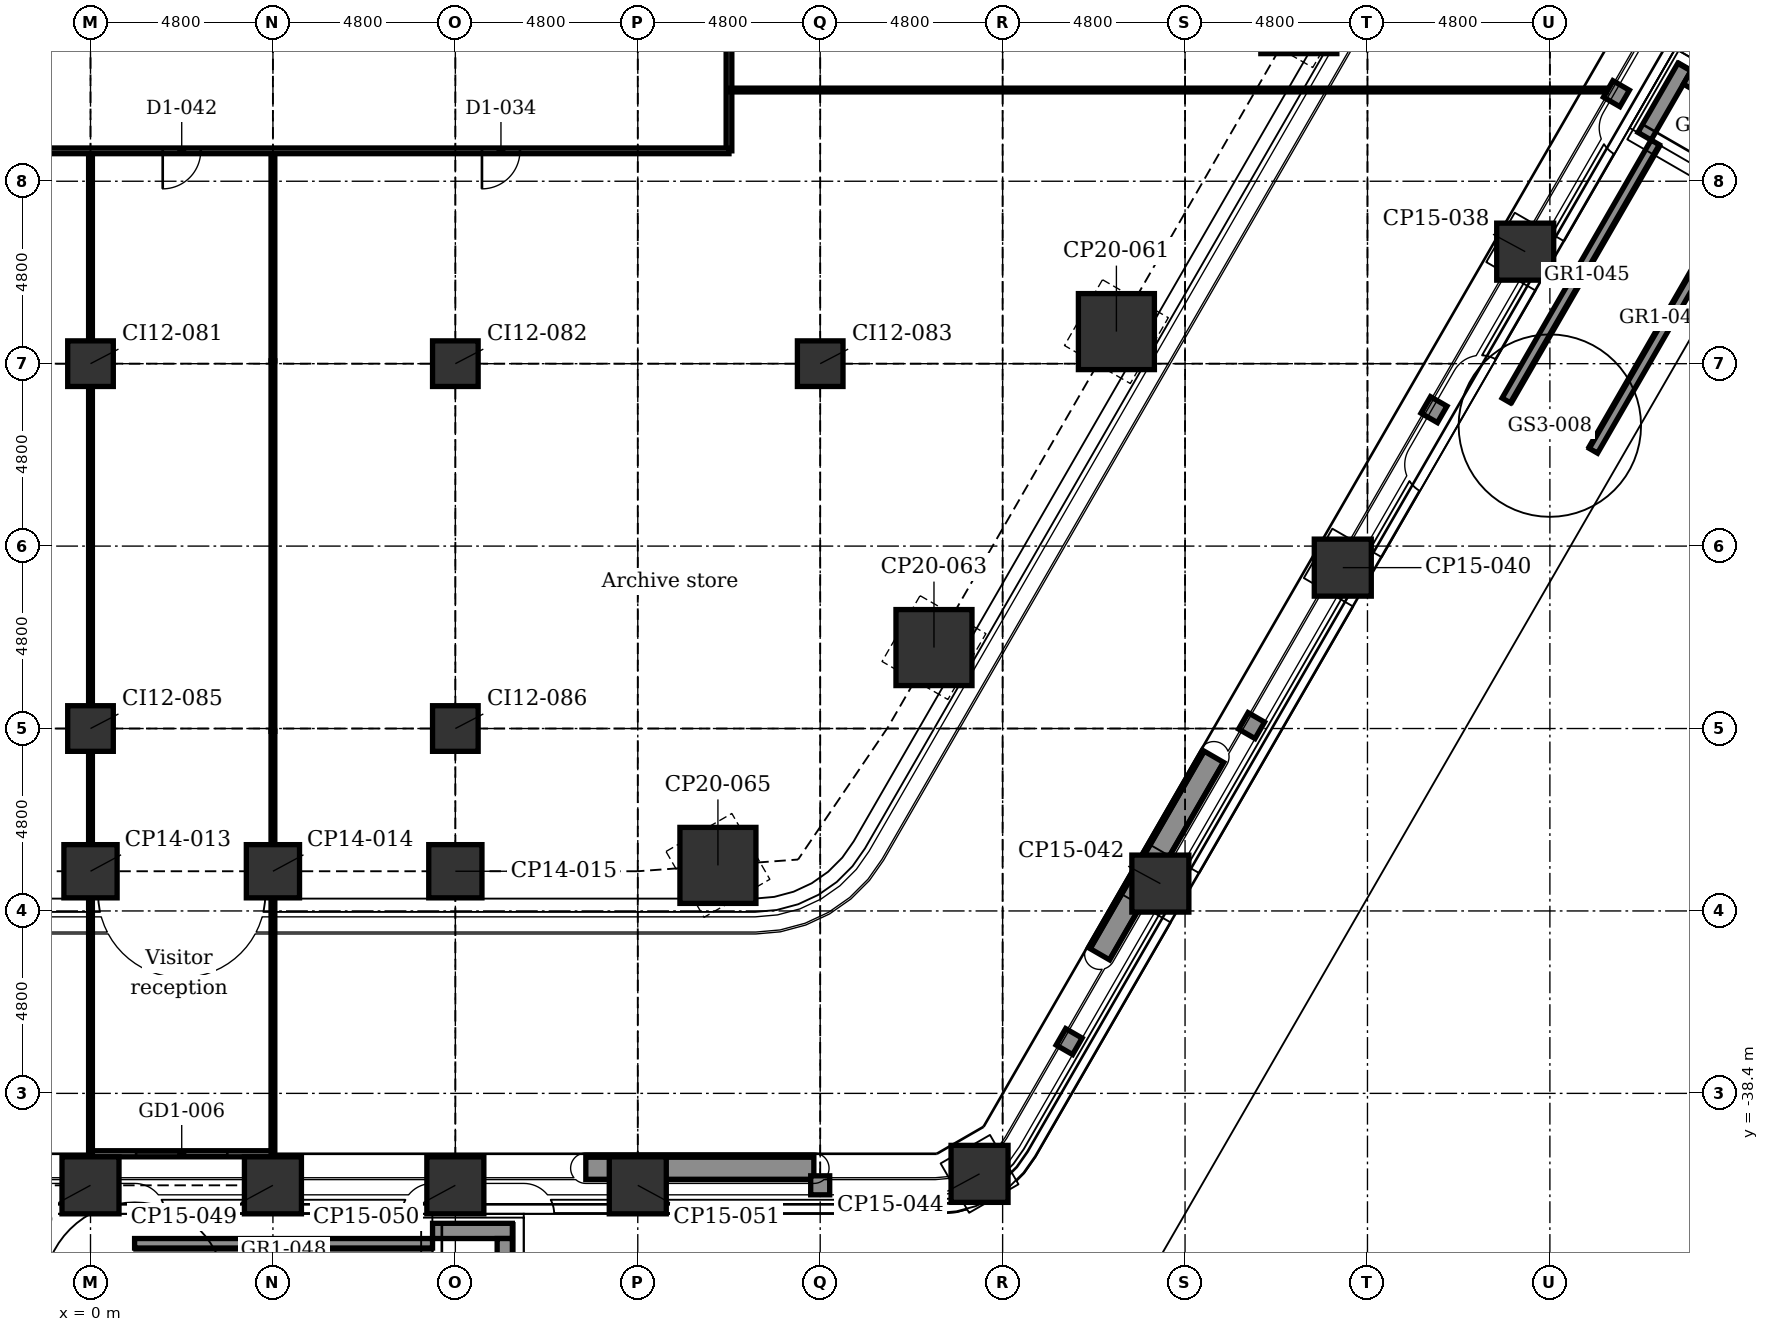
"""IFC4 building model, lengths in metres.
Left out: names, types, materials, properties, quantities, classifications, styles, units other than length and angle.
Written with IfcOpenShell. Run it as: python <this file> out.ifc"""

import sys

from ifc_helpers import new_model, si_unit, direction, frame, frame_2d, origin, origin_2d, place, context, subcontext, project, spatial, polyline, rectangle, outline, extrude, element, fill, save


model = new_model("IFC4")
c1 = context("Model", 3, precision=1e-05, world=origin(), true_north=direction((0.0, 1.0)))
c2 = subcontext(c1, "Body", "Model", "MODEL_VIEW")
j1 = project(units=[si_unit("LENGTHUNIT", "METRE"), si_unit("PLANEANGLEUNIT", "RADIAN")], contexts=[c1])
p1 = place(None, origin())
s1 = spatial("IfcSite", under=j1, at=p1, CompositionType="ELEMENT")
p2 = place(p1, origin())
s2 = spatial("IfcBuilding", under=s1, at=p2, CompositionType="ELEMENT")
p3 = place(p2, frame((0.0, 0.0, 12.4)))
s3 = spatial("IfcBuildingStorey", under=s2, at=p3, CompositionType="ELEMENT", Elevation=12.4)
for number, where, z_axis, x_axis in (
    (1, (37.75, -16.253, -0.3), (0.0, 0.0, 1.0), (0.5, 0.866, 0.0)),
    (2, (32.95, -24.567, -0.3), (0.0, 0.0, 1.0), (0.5, 0.866, 0.0)),
    (3, (28.15, -32.88, -0.3), (0.0, 0.0, 1.0), (0.5, 0.866, 0.0)),
    (4, (23.393, -40.518, -0.3), (0.0, 0.0, 1.0), (0.866, 0.5, 0.0)),
    (5, (14.4, -40.819, -0.3), (0.0, 0.0, 1.0), (1.0, 0.0, 0.0)),
    (6, (9.6, -40.819, -0.3), (0.0, 0.0, 1.0), (1.0, 0.0, 0.0)),
    (7, (4.8, -40.819, -0.3), (0.0, 0.0, 1.0), (1.0, 0.0, 0.0)),
    (8, (0.0, -40.819, -0.3), (0.0, 0.0, 1.0), (1.0, 0.0, 0.0)),
):
    element("IfcColumn", number, at=place(p3, frame(where, z_axis=z_axis, x_axis=x_axis)), inside=s3, PredefinedType="COLUMN", context=c2, shape_type="SweptSolid", body=[
        extrude(rectangle(XDim=1.5, YDim=1.5, at=origin_2d()), origin(), (0.0, 0.0, 1.0), 5.05),
    ])
for number, where, z_axis, x_axis in (
    (9, (31.794, -10.042, -0.3), (0.0, 0.0, 1.0), (0.5, 0.866, 0.0)),
    (10, (26.994, -18.356, -0.3), (0.0, 0.0, 1.0), (0.5, 0.866, 0.0)),
    (11, (22.194, -26.67, -0.3), (0.0, 0.0, 1.0), (0.5, 0.866, 0.0)),
    (12, (16.509, -32.401, -0.3), (0.0, 0.0, 1.0), (0.866, 0.5, 0.0)),
):
    element("IfcColumn", number, at=place(p3, frame(where, z_axis=z_axis, x_axis=x_axis)), inside=s3, PredefinedType="COLUMN", context=c2, shape_type="SweptSolid", body=[
        extrude(rectangle(XDim=2.0, YDim=2.0, at=origin_2d()), origin(), (0.0, 0.0, 1.0), 5.05),
    ])
for number, where, z_axis, x_axis in (
    (13, (9.6, -32.555, -0.3), (0.0, 0.0, 1.0), (1.0, 0.0, 0.0)),
    (14, (4.8, -32.555, -0.3), (0.0, 0.0, 1.0), (1.0, 0.0, 0.0)),
    (15, (0.0, -32.555, -0.3), (0.0, 0.0, 1.0), (1.0, 0.0, 0.0)),
):
    element("IfcColumn", number, at=place(p3, frame(where, z_axis=z_axis, x_axis=x_axis)), inside=s3, PredefinedType="COLUMN", context=c2, shape_type="SweptSolid", body=[
        extrude(rectangle(XDim=1.4, YDim=1.4, at=origin_2d()), origin(), (0.0, 0.0, 1.0), 5.05),
    ])
for number, where, z_axis, x_axis in (
    (16, (0.0, -28.8, -0.3), (0.0, 0.0, 1.0), (1.0, 0.0, 0.0)),
    (17, (0.0, -19.2, -0.3), (0.0, 0.0, 1.0), (1.0, 0.0, 0.0)),
    (18, (9.6, -28.8, -0.3), (0.0, 0.0, 1.0), (1.0, 0.0, 0.0)),
    (19, (9.6, -19.2, -0.3), (0.0, 0.0, 1.0), (1.0, 0.0, 0.0)),
    (20, (19.2, -19.2, -0.3), (0.0, 0.0, 1.0), (1.0, 0.0, 0.0)),
):
    element("IfcColumn", number, at=place(p3, frame(where, z_axis=z_axis, x_axis=x_axis)), inside=s3, PredefinedType="COLUMN", context=c2, shape_type="SweptSolid", body=[
        extrude(rectangle(XDim=1.2, YDim=1.2, at=origin_2d()), origin(), (0.0, 0.0, 1.0), 5.05),
    ])
p4 = place(p3, frame((4.77, -39.989, 0.0), z_axis=(0.0, 0.0, 1.0), x_axis=(-1.0, 0.0, 0.0)))
e21 = element("IfcWall", 21, at=p4, inside=s3, PredefinedType="PARTITIONING", context=c2, shape_type="SweptSolid", body=[
    extrude(rectangle(XDim=4.74, YDim=0.16, at=frame_2d((2.37, 0.0))), origin(), (0.0, 0.0, 1.0), 4.7),
])
p5 = place(p4, frame((1.17, 0.0, 0.0)))
e22 = element("IfcOpeningElement", 22, at=p5, cuts=e21, PredefinedType="OPENING", context=c2, shape_type="SweptSolid", body=[
    extrude(rectangle(XDim=2.4, YDim=2.4, at=frame_2d((1.2, 1.2))), frame((0.0, 0.09, 0.0), z_axis=(0.0, -1.0, 0.0), x_axis=(1.0, 0.0, 0.0)), (0.0, 0.0, 1.0), 0.18),
])
for number, where, z_axis, x_axis in (
    (23, (29.558, -29.543, 5.0), (0.0, 0.0, 1.0), (-0.5, -0.866, 0.0)),
    (24, (19.033, -40.369, 5.0), (0.0, 0.0, 1.0), (-1.0, 0.0, 0.0)),
):
    element("IfcWall", number, at=place(p3, frame(where, z_axis=z_axis, x_axis=x_axis)), inside=s3, PredefinedType="USERDEFINED", context=c2, shape_type="SweptSolid", body=[
        extrude(rectangle(XDim=6.0, YDim=0.6, at=frame_2d((3.0, 0.0))), origin(), (0.0, 0.0, 1.0), 0.7),
    ])
for number, where, z_axis, x_axis in (
    (25, (37.251, -20.167, 0.0), (0.0, 0.0, 1.0), (0.5, 0.866, 0.0)),
    (26, (39.546, -21.492, 0.0), (0.0, 0.0, 1.0), (0.5, 0.866, 0.0)),
):
    element("IfcWall", number, at=place(p3, frame(where, z_axis=z_axis, x_axis=x_axis)), inside=s3, PredefinedType="SOLIDWALL", context=c2, shape_type="SweptSolid", body=[
        extrude(outline(polyline([(0.0, 0.0), (7.84, 0.0), (7.84, 5.1), (0.0, 0.272), (0.0, 0.0)])), frame((0.0, 0.125, 0.0), z_axis=(0.0, -1.0, 0.0), x_axis=(1.0, 0.0, 0.0)), (0.0, 0.0, 1.0), 0.25),
    ])
p6 = place(p3, frame((41.94, -11.397, 0.45), z_axis=(0.0, 0.0, 1.0), x_axis=(-0.500027713859, -0.866009402589, 0.0)))
e27 = element("IfcWall", 27, at=p6, inside=s3, PredefinedType="SOLIDWALL", context=c2, shape_type="SweptSolid", body=[
    extrude(rectangle(XDim=2.1, YDim=0.4, at=frame_2d((1.05, 0.0))), origin(), (0.0, 0.0, 1.0), 4.35),
])
p7 = place(p3, frame((42.013, -11.67, 0.45), z_axis=(0.0, 0.0, 1.0), x_axis=(0.866017533419, -0.500013631625, 0.0)))
e28 = element("IfcWall", 28, at=p7, inside=s3, PredefinedType="SOLIDWALL", context=c2, shape_type="SweptSolid", body=[
    extrude(rectangle(XDim=2.25, YDim=0.4, at=frame_2d((1.125, 0.0))), origin(), (0.0, 0.0, 1.0), 4.35),
])
p8 = place(p3, frame((1.16, -42.344, 0.0), z_axis=(0.0, 0.0, 1.0), x_axis=(1.0, 0.0, 0.0)))
e29 = element("IfcWall", 29, at=p8, inside=s3, PredefinedType="SOLIDWALL", context=c2, shape_type="SweptSolid", body=[
    extrude(outline(polyline([(0.0, 0.0), (7.84, 0.0), (7.84, 5.1), (0.0, 0.272), (0.0, 0.0)])), frame((0.0, 0.125, 0.0), z_axis=(0.0, -1.0, 0.0), x_axis=(1.0, 0.0, 0.0)), (0.0, 0.0, 1.0), 0.25),
])
p9 = place(p3, frame((11.1, -42.019, 0.45), z_axis=(0.0, 0.0, 1.0), x_axis=(-1.0, 0.0, 0.0)))
e30 = element("IfcWall", 30, at=p9, inside=s3, PredefinedType="SOLIDWALL", context=c2, shape_type="SweptSolid", body=[
    extrude(rectangle(XDim=2.1, YDim=0.4, at=frame_2d((1.05, 0.0))), origin(), (0.0, 0.0, 1.0), 4.35),
])
p10 = place(p3, frame((10.9, -42.219, 0.45), z_axis=(0.0, 0.0, 1.0), x_axis=(0.0, -1.0, 0.0)))
e31 = element("IfcWall", 31, at=p10, inside=s3, PredefinedType="SOLIDWALL", context=c2, shape_type="SweptSolid", body=[
    extrude(rectangle(XDim=2.25, YDim=0.4, at=frame_2d((1.125, 0.0))), origin(), (0.0, 0.0, 1.0), 4.35),
])
p11 = place(p3, frame((40.275, -11.879, 0.0), z_axis=(0.0, 0.0, 1.0), x_axis=(-0.499919672301, -0.866071776036, 0.0)))
e32 = element("IfcWall", 32, at=p11, inside=s3, PredefinedType="SOLIDWALL", context=c2, shape_type="SweptSolid", body=[
    extrude(rectangle(XDim=0.5, YDim=0.5, at=frame_2d((0.25, 0.0))), origin(), (0.0, 0.0, 1.0), 4.45),
])
for number, where, z_axis, x_axis in (
    (33, (35.475, -20.194, 0.0), (0.0, 0.0, 1.0), (-0.5, -0.866, 0.0)),
    (34, (30.675, -28.507, 0.0), (0.0, 0.0, 1.0), (-0.5, -0.866, 0.0)),
    (35, (25.875, -36.821, 0.0), (0.0, 0.0, 1.0), (-0.5, -0.866, 0.0)),
):
    element("IfcWall", number, at=place(p3, frame(where, z_axis=z_axis, x_axis=x_axis)), inside=s3, PredefinedType="SOLIDWALL", context=c2, shape_type="SweptSolid", body=[
        extrude(rectangle(XDim=0.5, YDim=0.5, at=frame_2d((0.25, 0.0))), origin(), (0.0, 0.0, 1.0), 4.45),
    ])
p12 = place(p3, frame((19.45, -40.819, 0.0), z_axis=(0.0, 0.0, 1.0), x_axis=(-1.0, 0.0, 0.0)))
e36 = element("IfcWall", 36, at=p12, inside=s3, PredefinedType="SOLIDWALL", context=c2, shape_type="SweptSolid", body=[
    extrude(rectangle(XDim=0.5, YDim=0.5, at=frame_2d((0.25, 0.0))), origin(), (0.0, 0.0, 1.0), 4.45),
])
p13 = place(p3, frame((16.8, -13.6, 0.0), z_axis=(0.0, 0.0, 1.0), x_axis=(0.0, 1.0, 0.0)))
e37 = element("IfcWall", 37, at=p13, inside=s3, PredefinedType="PARTITIONING", context=c2, shape_type="SweptSolid", body=[
    extrude(rectangle(XDim=9.65, YDim=0.15, at=frame_2d((4.825, 0.0))), origin(), (0.0, 0.0, 1.0), 4.7),
])
p14 = place(p13, frame((6.2, 0.0, 0.0)))
e38 = element("IfcOpeningElement", 38, at=p14, cuts=e37, PredefinedType="OPENING", context=c2, shape_type="SweptSolid", body=[
    extrude(rectangle(XDim=1.0, YDim=2.1, at=frame_2d((0.5, 1.05))), frame((0.0, 0.085, 0.0), z_axis=(0.0, -1.0, 0.0), x_axis=(1.0, 0.0, 0.0)), (0.0, 0.0, 1.0), 0.17),
])
p15 = place(p3, frame((4.8, -28.874, 0.0), z_axis=(0.0, 0.0, 1.0), x_axis=(0.0, 1.0, 0.0)))
e39 = element("IfcWall", 39, at=p15, inside=s3, PredefinedType="PARTITIONING", context=c2, shape_type="SweptSolid", body=[
    extrude(rectangle(XDim=9.748, YDim=0.1, at=frame_2d((4.874, 0.0))), origin(), (0.0, 0.0, 1.0), 4.293),
])
p16 = place(p3, frame((4.8, -41.399, 0.0), z_axis=(0.0, 0.0, 1.0), x_axis=(0.0, 1.0, 0.0)))
e40 = element("IfcWall", 40, at=p16, inside=s3, PredefinedType="PARTITIONING", context=c2, shape_type="SweptSolid", body=[
    extrude(rectangle(XDim=9.504, YDim=0.1, at=frame_2d((4.752, 0.0))), origin(), (0.0, 0.0, 1.0), 4.7),
])
p17 = place(p3, frame((4.8, -31.896, 0.0), z_axis=(0.0, 0.0, 1.0), x_axis=(0.0, 1.0, 0.0)))
e41 = element("IfcWall", 41, at=p17, inside=s3, PredefinedType="PARTITIONING", context=c2, shape_type="SweptSolid", body=[
    extrude(rectangle(XDim=3.021, YDim=0.1, at=frame_2d((1.511, 0.0))), origin(), (0.0, 0.0, 1.0), 4.44),
])
p18 = place(p3, frame((4.8, -19.126, 0.0), z_axis=(0.0, 0.0, 1.0), x_axis=(0.0, 1.0, 0.0)))
e42 = element("IfcWall", 42, at=p18, inside=s3, PredefinedType="PARTITIONING", context=c2, shape_type="SweptSolid", body=[
    extrude(rectangle(XDim=5.526, YDim=0.1, at=frame_2d((2.763, 0.0))), origin(), (0.0, 0.0, 1.0), 4.343),
])
p19 = place(p3, frame((0.0, -41.399, 0.0), z_axis=(0.0, 0.0, 1.0), x_axis=(0.0, 1.0, 0.0)))
e43 = element("IfcWall", 43, at=p19, inside=s3, PredefinedType="PARTITIONING", context=c2, shape_type="SweptSolid", body=[
    extrude(rectangle(XDim=9.504, YDim=0.1, at=frame_2d((4.752, 0.0))), origin(), (0.0, 0.0, 1.0), 4.7),
])
p20 = place(p3, frame((0.0, -31.896, 0.0), z_axis=(0.0, 0.0, 1.0), x_axis=(0.0, 1.0, 0.0)))
e44 = element("IfcWall", 44, at=p20, inside=s3, PredefinedType="PARTITIONING", context=c2, shape_type="SweptSolid", body=[
    extrude(rectangle(XDim=2.535, YDim=0.1, at=frame_2d((1.268, 0.0))), origin(), (0.0, 0.0, 1.0), 4.44),
])
p21 = place(p3, frame((0.0, -29.36, 0.0), z_axis=(0.0, 0.0, 1.0), x_axis=(0.0, 1.0, 0.0)))
e45 = element("IfcWall", 45, at=p21, inside=s3, PredefinedType="PARTITIONING", context=c2, shape_type="SweptSolid", body=[
    extrude(rectangle(XDim=1.12, YDim=0.1, at=frame_2d((0.56, 0.0))), origin(), (0.0, 0.0, 1.0), 4.7),
])
p22 = place(p3, frame((0.0, -28.24, 0.0), z_axis=(0.0, 0.0, 1.0), x_axis=(0.0, 1.0, 0.0)))
e46 = element("IfcWall", 46, at=p22, inside=s3, PredefinedType="PARTITIONING", context=c2, shape_type="SweptSolid", body=[
    extrude(rectangle(XDim=8.48, YDim=0.1, at=frame_2d((4.24, 0.0))), origin(), (0.0, 0.0, 1.0), 4.343),
])
p23 = place(p3, frame((0.0, -19.76, 0.0), z_axis=(0.0, 0.0, 1.0), x_axis=(0.0, 1.0, 0.0)))
e47 = element("IfcWall", 47, at=p23, inside=s3, PredefinedType="PARTITIONING", context=c2, shape_type="SweptSolid", body=[
    extrude(rectangle(XDim=1.12, YDim=0.1, at=frame_2d((0.56, 0.0))), origin(), (0.0, 0.0, 1.0), 4.7),
])
p24 = place(p3, frame((0.0, -18.64, 0.0), z_axis=(0.0, 0.0, 1.0), x_axis=(0.0, 1.0, 0.0)))
e48 = element("IfcWall", 48, at=p24, inside=s3, PredefinedType="PARTITIONING", context=c2, shape_type="SweptSolid", body=[
    extrude(rectangle(XDim=5.04, YDim=0.1, at=frame_2d((2.52, 0.0))), origin(), (0.0, 0.0, 1.0), 4.343),
])
p25 = place(p3, frame((-16.8, -13.6, 0.0), z_axis=(0.0, 0.0, 1.0), x_axis=(1.0, 0.0, 0.0)))
e49 = element("IfcWall", 49, at=p25, inside=s3, PredefinedType="PARTITIONING", context=c2, shape_type="SweptSolid", body=[
    extrude(rectangle(XDim=33.6, YDim=0.15, at=frame_2d((16.8, 0.0))), origin(), (0.0, 0.0, 1.0), 4.7),
])
p26 = place(p25, frame((3.1, 0.0, 0.0)))
e50 = element("IfcOpeningElement", 50, at=p26, cuts=e49, PredefinedType="OPENING", context=c2, shape_type="SweptSolid", body=[
    extrude(rectangle(XDim=1.0, YDim=2.1, at=frame_2d((0.5, 1.05))), frame((0.0, 0.085, 0.0), z_axis=(0.0, -1.0, 0.0), x_axis=(1.0, 0.0, 0.0)), (0.0, 0.0, 1.0), 0.17),
])
p27 = place(p25, frame((11.5, 0.0, 0.0)))
e51 = element("IfcOpeningElement", 51, at=p27, cuts=e49, PredefinedType="OPENING", context=c2, shape_type="SweptSolid", body=[
    extrude(rectangle(XDim=1.0, YDim=2.1, at=frame_2d((0.5, 1.05))), frame((0.0, 0.085, 0.0), z_axis=(0.0, -1.0, 0.0), x_axis=(1.0, 0.0, 0.0)), (0.0, 0.0, 1.0), 0.17),
])
p28 = place(p25, frame((27.1, 0.0, 0.0)))
e52 = element("IfcOpeningElement", 52, at=p28, cuts=e49, PredefinedType="OPENING", context=c2, shape_type="SweptSolid", body=[
    extrude(rectangle(XDim=1.0, YDim=2.1, at=frame_2d((0.5, 1.05))), frame((0.0, 0.085, 0.0), z_axis=(0.0, -1.0, 0.0), x_axis=(1.0, 0.0, 0.0)), (0.0, 0.0, 1.0), 0.17),
])
p29 = place(p25, frame((18.7, 0.0, 0.0)))
e53 = element("IfcOpeningElement", 53, at=p29, cuts=e49, PredefinedType="OPENING", context=c2, shape_type="SweptSolid", body=[
    extrude(rectangle(XDim=1.0, YDim=2.1, at=frame_2d((0.5, 1.05))), frame((0.0, 0.085, 0.0), z_axis=(0.0, -1.0, 0.0), x_axis=(1.0, 0.0, 0.0)), (0.0, 0.0, 1.0), 0.17),
])
p30 = place(p3, frame((16.8, -12.0, 0.0), z_axis=(0.0, 0.0, 1.0), x_axis=(1.0, 0.0, 0.0)))
e54 = element("IfcWall", 54, at=p30, inside=s3, PredefinedType="PARTITIONING", context=c2, shape_type="SweptSolid", body=[
    extrude(rectangle(XDim=23.088, YDim=0.1, at=frame_2d((11.544, 0.0))), origin(), (0.0, 0.0, 1.0), 4.7),
])
p31 = place(p5, origin())
e55 = element("IfcDoor", 55, at=p31, inside=s3, OperationType="DOUBLE_DOOR_SLIDING", PredefinedType="DOOR", context=c2, shape_type="SweptSolid", body=[
    extrude(rectangle(XDim=2.4, YDim=2.4, at=frame_2d((1.2, 1.2))), frame((0.0, 0.025, 0.0), z_axis=(0.0, -1.0, 0.0), x_axis=(1.0, 0.0, 0.0)), (0.0, 0.0, 1.0), 0.05),
])
fill(e22, e55)
p32 = place(p28, frame((1.0, 0.0, 0.0), z_axis=(0.0, 0.0, 1.0), x_axis=(-1.0, 0.0, 0.0)))
e56 = element("IfcDoor", 56, at=p32, inside=s3, OperationType="SINGLE_SWING_LEFT", PredefinedType="DOOR", context=c2, shape_type="SweptSolid", body=[
    extrude(rectangle(XDim=1.0, YDim=2.1, at=frame_2d((0.5, 1.05))), frame((0.0, 0.025, 0.0), z_axis=(0.0, -1.0, 0.0), x_axis=(1.0, 0.0, 0.0)), (0.0, 0.0, 1.0), 0.05),
])
fill(e52, e56)
p33 = place(p29, frame((1.0, 0.0, 0.0), z_axis=(0.0, 0.0, 1.0), x_axis=(-1.0, 0.0, 0.0)))
e57 = element("IfcDoor", 57, at=p33, inside=s3, OperationType="SINGLE_SWING_LEFT", PredefinedType="DOOR", context=c2, shape_type="SweptSolid", body=[
    extrude(rectangle(XDim=1.0, YDim=2.1, at=frame_2d((0.5, 1.05))), frame((0.0, 0.025, 0.0), z_axis=(0.0, -1.0, 0.0), x_axis=(1.0, 0.0, 0.0)), (0.0, 0.0, 1.0), 0.05),
])
fill(e53, e57)
save(model, sys.argv[1])
